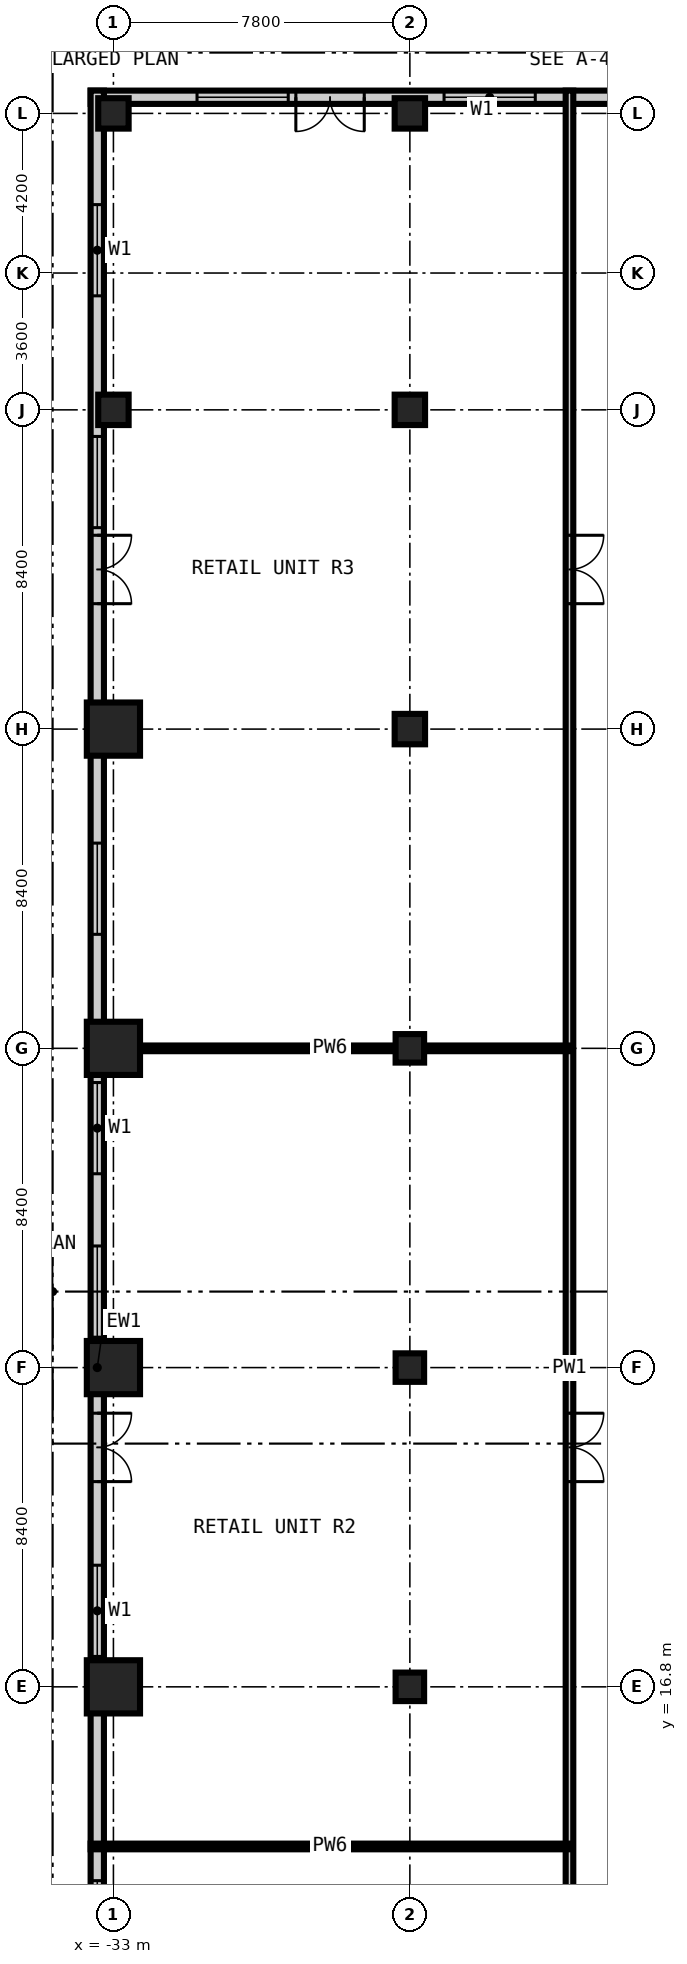
"""IFC4 building model, lengths in metres.
Left out: names, types, materials, properties, quantities, classifications, styles, units other than length and angle.
Written with IfcOpenShell. Run it as: python <this file> out.ifc"""

import sys

from ifc_helpers import new_model, si_unit, direction, frame, frame_2d, origin, origin_2d, place, context, subcontext, project, spatial, rectangle, extrude, element, fill, save


model = new_model("IFC4")
c1 = context("Model", 3, precision=1e-05, world=origin(), true_north=direction((0.0, 1.0)))
c2 = subcontext(c1, "Body", "Model", "MODEL_VIEW")
j1 = project(units=[si_unit("LENGTHUNIT", "METRE"), si_unit("PLANEANGLEUNIT", "RADIAN")], contexts=[c1])
p1 = place(None, origin())
s1 = spatial("IfcSite", under=j1, at=p1, CompositionType="ELEMENT")
p2 = place(p1, origin())
s2 = spatial("IfcBuilding", under=s1, at=p2, CompositionType="ELEMENT")
p3 = place(p2, origin())
s3 = spatial("IfcBuildingStorey", under=s2, at=p3, CompositionType="ELEMENT", Elevation=0.0)
for number, where, z_axis, x_axis in (
    (1, (-33.0, 16.8, -0.5), (0.0, 0.0, 1.0), (1.0, 0.0, 0.0)),
    (2, (-33.0, 25.2, -0.5), (0.0, 0.0, 1.0), (1.0, 0.0, 0.0)),
    (3, (-33.0, 33.6, -0.5), (0.0, 0.0, 1.0), (1.0, 0.0, 0.0)),
):
    element("IfcColumn", number, at=place(p3, frame(where, z_axis=z_axis, x_axis=x_axis)), inside=s3, PredefinedType="COLUMN", context=c2, shape_type="SweptSolid", body=[
        extrude(rectangle(XDim=1.4, YDim=1.4, at=origin_2d()), origin(), (0.0, 0.0, 1.0), 6.2),
    ])
p4 = place(p3, frame((-33.0, 42.0, -0.3), z_axis=(0.0, 0.0, 1.0), x_axis=(1.0, 0.0, 0.0)))
e4 = element("IfcColumn", 4, at=p4, inside=s3, PredefinedType="COLUMN", context=c2, shape_type="SweptSolid", body=[
    extrude(rectangle(XDim=1.4, YDim=1.4, at=origin_2d()), origin(), (0.0, 0.0, 1.0), 6.0),
])
for number, where, z_axis, x_axis in (
    (5, (-33.0, 50.4, -0.5), (0.0, 0.0, 1.0), (1.0, 0.0, 0.0)),
    (6, (-33.0, 58.2, -0.5), (0.0, 0.0, 1.0), (1.0, 0.0, 0.0)),
):
    element("IfcColumn", number, at=place(p3, frame(where, z_axis=z_axis, x_axis=x_axis)), inside=s3, PredefinedType="COLUMN", context=c2, shape_type="SweptSolid", body=[
        extrude(rectangle(XDim=0.8, YDim=0.8, at=origin_2d()), origin(), (0.0, 0.0, 1.0), 6.2),
    ])
for number, where, z_axis, x_axis in (
    (7, (-25.2, 16.8, -0.5), (0.0, 0.0, 1.0), (1.0, 0.0, 0.0)),
    (8, (-25.2, 25.2, -0.5), (0.0, 0.0, 1.0), (1.0, 0.0, 0.0)),
    (9, (-25.2, 33.6, -0.5), (0.0, 0.0, 1.0), (1.0, 0.0, 0.0)),
):
    element("IfcColumn", number, at=place(p3, frame(where, z_axis=z_axis, x_axis=x_axis)), inside=s3, PredefinedType="COLUMN", context=c2, shape_type="SweptSolid", body=[
        extrude(rectangle(XDim=0.75, YDim=0.75, at=origin_2d()), origin(), (0.0, 0.0, 1.0), 6.2),
    ])
p5 = place(p3, frame((-25.2, 42.0, -0.3), z_axis=(0.0, 0.0, 1.0), x_axis=(1.0, 0.0, 0.0)))
e10 = element("IfcColumn", 10, at=p5, inside=s3, PredefinedType="COLUMN", context=c2, shape_type="SweptSolid", body=[
    extrude(rectangle(XDim=0.8, YDim=0.8, at=origin_2d()), origin(), (0.0, 0.0, 1.0), 6.0),
])
for number, where, z_axis, x_axis in (
    (11, (-25.2, 50.4, -0.5), (0.0, 0.0, 1.0), (1.0, 0.0, 0.0)),
    (12, (-25.2, 58.2, -0.5), (0.0, 0.0, 1.0), (1.0, 0.0, 0.0)),
):
    element("IfcColumn", number, at=place(p3, frame(where, z_axis=z_axis, x_axis=x_axis)), inside=s3, PredefinedType="COLUMN", context=c2, shape_type="SweptSolid", body=[
        extrude(rectangle(XDim=0.8, YDim=0.8, at=origin_2d()), origin(), (0.0, 0.0, 1.0), 6.2),
    ])
p6 = place(p3, frame((58.8, 58.625, 0.0), z_axis=(0.0, 0.0, 1.0), x_axis=(-1.0, 0.0, 0.0)))
e13 = element("IfcWall", 13, at=p6, inside=s3, PredefinedType="SOLIDWALL", context=c2, shape_type="SweptSolid", body=[
    extrude(rectangle(XDim=92.4, YDim=0.35, at=frame_2d((46.2, 0.0))), origin(), (0.0, 0.0, 1.0), 5.7),
])
p7 = place(p6, frame((85.2, 0.0, 0.0)))
e14 = element("IfcOpeningElement", 14, at=p7, cuts=e13, PredefinedType="OPENING", context=c2, shape_type="SweptSolid", body=[
    extrude(rectangle(XDim=1.8, YDim=2.7, at=frame_2d((0.9, 1.35))), frame((0.0, 0.185, 0.0), z_axis=(0.0, -1.0, 0.0), x_axis=(1.0, 0.0, 0.0)), (0.0, 0.0, 1.0), 0.37),
])
p8 = place(p6, frame((87.2, 0.0, 0.9)))
e15 = element("IfcOpeningElement", 15, at=p8, cuts=e13, PredefinedType="OPENING", context=c2, shape_type="SweptSolid", body=[
    extrude(rectangle(XDim=2.4, YDim=2.4, at=frame_2d((1.2, 1.2))), frame((0.0, 0.185, 0.0), z_axis=(0.0, -1.0, 0.0), x_axis=(1.0, 0.0, 0.0)), (0.0, 0.0, 1.0), 0.37),
])
p9 = place(p6, frame((80.7, 0.0, 0.9)))
e16 = element("IfcOpeningElement", 16, at=p9, cuts=e13, PredefinedType="OPENING", context=c2, shape_type="SweptSolid", body=[
    extrude(rectangle(XDim=2.4, YDim=2.4, at=frame_2d((1.2, 1.2))), frame((0.0, 0.185, 0.0), z_axis=(0.0, -1.0, 0.0), x_axis=(1.0, 0.0, 0.0)), (0.0, 0.0, 1.0), 0.37),
])
p10 = place(p6, frame((76.2, 0.0, 0.9)))
e17 = element("IfcOpeningElement", 17, at=p10, cuts=e13, PredefinedType="OPENING", context=c2, shape_type="SweptSolid", body=[
    extrude(rectangle(XDim=2.4, YDim=2.4, at=frame_2d((1.2, 1.2))), frame((0.0, 0.185, 0.0), z_axis=(0.0, -1.0, 0.0), x_axis=(1.0, 0.0, 0.0)), (0.0, 0.0, 1.0), 0.37),
])
p11 = place(p6, frame((71.9, 0.0, 0.0)))
e18 = element("IfcOpeningElement", 18, at=p11, cuts=e13, PredefinedType="OPENING", context=c2, shape_type="SweptSolid", body=[
    extrude(rectangle(XDim=1.2, YDim=2.4, at=frame_2d((0.6, 1.2))), frame((0.0, 0.185, 0.0), z_axis=(0.0, -1.0, 0.0), x_axis=(1.0, 0.0, 0.0)), (0.0, 0.0, 1.0), 0.37),
])
p12 = place(p6, frame((63.5, 0.0, 0.0)))
e19 = element("IfcOpeningElement", 19, at=p12, cuts=e13, PredefinedType="OPENING", context=c2, shape_type="SweptSolid", body=[
    extrude(rectangle(XDim=1.2, YDim=2.4, at=frame_2d((0.6, 1.2))), frame((0.0, 0.185, 0.0), z_axis=(0.0, -1.0, 0.0), x_axis=(1.0, 0.0, 0.0)), (0.0, 0.0, 1.0), 0.37),
])
p13 = place(p6, frame((59.0, 0.0, 0.0)))
e20 = element("IfcOpeningElement", 20, at=p13, cuts=e13, PredefinedType="OPENING", context=c2, shape_type="SweptSolid", body=[
    extrude(rectangle(XDim=2.4, YDim=3.0, at=frame_2d((1.2, 1.5))), frame((0.0, 0.185, 0.0), z_axis=(0.0, -1.0, 0.0), x_axis=(1.0, 0.0, 0.0)), (0.0, 0.0, 1.0), 0.37),
])
p14 = place(p6, frame((53.4, 0.0, 0.9)))
e21 = element("IfcOpeningElement", 21, at=p14, cuts=e13, PredefinedType="OPENING", context=c2, shape_type="SweptSolid", body=[
    extrude(rectangle(XDim=2.4, YDim=2.4, at=frame_2d((1.2, 1.2))), frame((0.0, 0.185, 0.0), z_axis=(0.0, -1.0, 0.0), x_axis=(1.0, 0.0, 0.0)), (0.0, 0.0, 1.0), 0.37),
])
p15 = place(p6, frame((43.25, 0.0, 0.0)))
e22 = element("IfcOpeningElement", 22, at=p15, cuts=e13, PredefinedType="OPENING", context=c2, shape_type="SweptSolid", body=[
    extrude(rectangle(XDim=2.4, YDim=3.0, at=frame_2d((1.2, 1.5))), frame((0.0, 0.185, 0.0), z_axis=(0.0, -1.0, 0.0), x_axis=(1.0, 0.0, 0.0)), (0.0, 0.0, 1.0), 0.37),
])
p16 = place(p6, frame((37.7, 0.0, 0.0)))
e23 = element("IfcOpeningElement", 23, at=p16, cuts=e13, PredefinedType="OPENING", context=c2, shape_type="SweptSolid", body=[
    extrude(rectangle(XDim=1.2, YDim=2.4, at=frame_2d((0.6, 1.2))), frame((0.0, 0.185, 0.0), z_axis=(0.0, -1.0, 0.0), x_axis=(1.0, 0.0, 0.0)), (0.0, 0.0, 1.0), 0.37),
])
p17 = place(p6, frame((29.2, 0.0, 0.0)))
e24 = element("IfcOpeningElement", 24, at=p17, cuts=e13, PredefinedType="OPENING", context=c2, shape_type="SweptSolid", body=[
    extrude(rectangle(XDim=1.2, YDim=2.4, at=frame_2d((0.6, 1.2))), frame((0.0, 0.185, 0.0), z_axis=(0.0, -1.0, 0.0), x_axis=(1.0, 0.0, 0.0)), (0.0, 0.0, 1.0), 0.37),
])
p18 = place(p6, frame((3.5, 0.0, 0.0)))
e25 = element("IfcOpeningElement", 25, at=p18, cuts=e13, PredefinedType="OPENING", context=c2, shape_type="SweptSolid", body=[
    extrude(rectangle(XDim=3.6, YDim=4.5, at=frame_2d((1.8, 2.25))), frame((0.0, 0.185, 0.0), z_axis=(0.0, -1.0, 0.0), x_axis=(1.0, 0.0, 0.0)), (0.0, 0.0, 1.0), 0.37),
])
p19 = place(p6, frame((11.4, 0.0, 0.9)))
e26 = element("IfcOpeningElement", 26, at=p19, cuts=e13, PredefinedType="OPENING", context=c2, shape_type="SweptSolid", body=[
    extrude(rectangle(XDim=2.4, YDim=2.4, at=frame_2d((1.2, 1.2))), frame((0.0, 0.185, 0.0), z_axis=(0.0, -1.0, 0.0), x_axis=(1.0, 0.0, 0.0)), (0.0, 0.0, 1.0), 0.37),
])
p20 = place(p3, frame((-33.425, 58.8, 0.0), z_axis=(0.0, 0.0, 1.0), x_axis=(0.0, -1.0, 0.0)))
e27 = element("IfcWall", 27, at=p20, inside=s3, PredefinedType="SOLIDWALL", context=c2, shape_type="SweptSolid", body=[
    extrude(rectangle(XDim=67.2, YDim=0.35, at=frame_2d((33.6, 0.0))), origin(), (0.0, 0.0, 1.0), 5.7),
])
p21 = place(p20, frame((55.8, 0.0, 0.0)))
e28 = element("IfcOpeningElement", 28, at=p21, cuts=e27, PredefinedType="OPENING", context=c2, shape_type="SweptSolid", body=[
    extrude(rectangle(XDim=1.8, YDim=2.7, at=frame_2d((0.9, 1.35))), frame((0.0, 0.185, 0.0), z_axis=(0.0, -1.0, 0.0), x_axis=(1.0, 0.0, 0.0)), (0.0, 0.0, 1.0), 0.37),
])
p22 = place(p20, frame((61.8, 0.0, 0.9)))
e29 = element("IfcOpeningElement", 29, at=p22, cuts=e27, PredefinedType="OPENING", context=c2, shape_type="SweptSolid", body=[
    extrude(rectangle(XDim=2.4, YDim=2.4, at=frame_2d((1.2, 1.2))), frame((0.0, 0.185, 0.0), z_axis=(0.0, -1.0, 0.0), x_axis=(1.0, 0.0, 0.0)), (0.0, 0.0, 1.0), 0.37),
])
p23 = place(p20, frame((53.2, 0.0, 0.9)))
e30 = element("IfcOpeningElement", 30, at=p23, cuts=e27, PredefinedType="OPENING", context=c2, shape_type="SweptSolid", body=[
    extrude(rectangle(XDim=2.4, YDim=2.4, at=frame_2d((1.2, 1.2))), frame((0.0, 0.185, 0.0), z_axis=(0.0, -1.0, 0.0), x_axis=(1.0, 0.0, 0.0)), (0.0, 0.0, 1.0), 0.37),
])
p24 = place(p20, frame((47.1, 0.0, 0.9)))
e31 = element("IfcOpeningElement", 31, at=p24, cuts=e27, PredefinedType="OPENING", context=c2, shape_type="SweptSolid", body=[
    extrude(rectangle(XDim=2.4, YDim=2.4, at=frame_2d((1.2, 1.2))), frame((0.0, 0.185, 0.0), z_axis=(0.0, -1.0, 0.0), x_axis=(1.0, 0.0, 0.0)), (0.0, 0.0, 1.0), 0.37),
])
p25 = place(p20, frame((34.8, 0.0, 0.0)))
e32 = element("IfcOpeningElement", 32, at=p25, cuts=e27, PredefinedType="OPENING", context=c2, shape_type="SweptSolid", body=[
    extrude(rectangle(XDim=1.8, YDim=2.7, at=frame_2d((0.9, 1.35))), frame((0.0, 0.185, 0.0), z_axis=(0.0, -1.0, 0.0), x_axis=(1.0, 0.0, 0.0)), (0.0, 0.0, 1.0), 0.37),
])
p26 = place(p20, frame((38.8, 0.0, 0.9)))
e33 = element("IfcOpeningElement", 33, at=p26, cuts=e27, PredefinedType="OPENING", context=c2, shape_type="SweptSolid", body=[
    extrude(rectangle(XDim=2.4, YDim=2.4, at=frame_2d((1.2, 1.2))), frame((0.0, 0.185, 0.0), z_axis=(0.0, -1.0, 0.0), x_axis=(1.0, 0.0, 0.0)), (0.0, 0.0, 1.0), 0.37),
])
p27 = place(p20, frame((30.4, 0.0, 0.9)))
e34 = element("IfcOpeningElement", 34, at=p27, cuts=e27, PredefinedType="OPENING", context=c2, shape_type="SweptSolid", body=[
    extrude(rectangle(XDim=2.4, YDim=2.4, at=frame_2d((1.2, 1.2))), frame((0.0, 0.185, 0.0), z_axis=(0.0, -1.0, 0.0), x_axis=(1.0, 0.0, 0.0)), (0.0, 0.0, 1.0), 0.37),
])
p28 = place(p20, frame((26.1, 0.0, 0.9)))
e35 = element("IfcOpeningElement", 35, at=p28, cuts=e27, PredefinedType="OPENING", context=c2, shape_type="SweptSolid", body=[
    extrude(rectangle(XDim=2.4, YDim=2.4, at=frame_2d((1.2, 1.2))), frame((0.0, 0.185, 0.0), z_axis=(0.0, -1.0, 0.0), x_axis=(1.0, 0.0, 0.0)), (0.0, 0.0, 1.0), 0.37),
])
p29 = place(p20, frame((11.7, 0.0, 0.0)))
e36 = element("IfcOpeningElement", 36, at=p29, cuts=e27, PredefinedType="OPENING", context=c2, shape_type="SweptSolid", body=[
    extrude(rectangle(XDim=1.8, YDim=2.7, at=frame_2d((0.9, 1.35))), frame((0.0, 0.185, 0.0), z_axis=(0.0, -1.0, 0.0), x_axis=(1.0, 0.0, 0.0)), (0.0, 0.0, 1.0), 0.37),
])
p30 = place(p20, frame((19.8, 0.0, 0.9)))
e37 = element("IfcOpeningElement", 37, at=p30, cuts=e27, PredefinedType="OPENING", context=c2, shape_type="SweptSolid", body=[
    extrude(rectangle(XDim=2.4, YDim=2.4, at=frame_2d((1.2, 1.2))), frame((0.0, 0.185, 0.0), z_axis=(0.0, -1.0, 0.0), x_axis=(1.0, 0.0, 0.0)), (0.0, 0.0, 1.0), 0.37),
])
p31 = place(p20, frame((9.1, 0.0, 0.9)))
e38 = element("IfcOpeningElement", 38, at=p31, cuts=e27, PredefinedType="OPENING", context=c2, shape_type="SweptSolid", body=[
    extrude(rectangle(XDim=2.4, YDim=2.4, at=frame_2d((1.2, 1.2))), frame((0.0, 0.185, 0.0), z_axis=(0.0, -1.0, 0.0), x_axis=(1.0, 0.0, 0.0)), (0.0, 0.0, 1.0), 0.37),
])
p32 = place(p20, frame((3.0, 0.0, 0.9)))
e39 = element("IfcOpeningElement", 39, at=p32, cuts=e27, PredefinedType="OPENING", context=c2, shape_type="SweptSolid", body=[
    extrude(rectangle(XDim=2.4, YDim=2.4, at=frame_2d((1.2, 1.2))), frame((0.0, 0.185, 0.0), z_axis=(0.0, -1.0, 0.0), x_axis=(1.0, 0.0, 0.0)), (0.0, 0.0, 1.0), 0.37),
])
p33 = place(p3, frame((-21.0, 58.8, 0.0), z_axis=(0.0, 0.0, 1.0), x_axis=(0.0, -1.0, 0.0)))
e40 = element("IfcWall", 40, at=p33, inside=s3, PredefinedType="PARTITIONING", context=c2, shape_type="SweptSolid", body=[
    extrude(rectangle(XDim=67.2, YDim=0.2, at=frame_2d((33.6, 0.0))), origin(), (0.0, 0.0, 1.0), 5.7),
])
p34 = place(p33, frame((55.8, 0.0, 0.0)))
e41 = element("IfcOpeningElement", 41, at=p34, cuts=e40, PredefinedType="OPENING", context=c2, shape_type="SweptSolid", body=[
    extrude(rectangle(XDim=1.8, YDim=2.7, at=frame_2d((0.9, 1.35))), frame((0.0, 0.11, 0.0), z_axis=(0.0, -1.0, 0.0), x_axis=(1.0, 0.0, 0.0)), (0.0, 0.0, 1.0), 0.22),
])
p35 = place(p33, frame((34.8, 0.0, 0.0)))
e42 = element("IfcOpeningElement", 42, at=p35, cuts=e40, PredefinedType="OPENING", context=c2, shape_type="SweptSolid", body=[
    extrude(rectangle(XDim=1.8, YDim=2.7, at=frame_2d((0.9, 1.35))), frame((0.0, 0.11, 0.0), z_axis=(0.0, -1.0, 0.0), x_axis=(1.0, 0.0, 0.0)), (0.0, 0.0, 1.0), 0.22),
])
p36 = place(p33, frame((11.7, 0.0, 0.0)))
e43 = element("IfcOpeningElement", 43, at=p36, cuts=e40, PredefinedType="OPENING", context=c2, shape_type="SweptSolid", body=[
    extrude(rectangle(XDim=1.8, YDim=2.7, at=frame_2d((0.9, 1.35))), frame((0.0, 0.11, 0.0), z_axis=(0.0, -1.0, 0.0), x_axis=(1.0, 0.0, 0.0)), (0.0, 0.0, 1.0), 0.22),
])
for number, where, z_axis, x_axis in (
    (44, (-33.6, 12.6, 0.0), (0.0, 0.0, 1.0), (1.0, 0.0, 0.0)),
    (45, (-33.6, 33.6, 0.0), (0.0, 0.0, 1.0), (1.0, 0.0, 0.0)),
):
    element("IfcWall", number, at=place(p3, frame(where, z_axis=z_axis, x_axis=x_axis)), inside=s3, PredefinedType="PARTITIONING", context=c2, shape_type="SweptSolid", body=[
        extrude(rectangle(XDim=12.6, YDim=0.15, at=frame_2d((6.3, 0.0))), origin(), (0.0, 0.0, 1.0), 5.7),
    ])
p37 = place(p7, origin())
e46 = element("IfcDoor", 46, at=p37, inside=s3, OperationType="DOUBLE_DOOR_DOUBLE_SWING", PredefinedType="DOOR", context=c2, shape_type="SweptSolid", body=[
    extrude(rectangle(XDim=1.8, YDim=2.7, at=frame_2d((0.9, 1.35))), frame((0.0, 0.025, 0.0), z_axis=(0.0, -1.0, 0.0), x_axis=(1.0, 0.0, 0.0)), (0.0, 0.0, 1.0), 0.05),
])
fill(e14, e46)
p38 = place(p8, origin())
e47 = element("IfcWindow", 47, at=p38, inside=s3, PartitioningType="SINGLE_PANEL", PredefinedType="WINDOW", context=c2, shape_type="SweptSolid", body=[
    extrude(rectangle(XDim=2.4, YDim=2.4, at=frame_2d((1.2, 1.2))), frame((0.0, 0.03, 0.0), z_axis=(0.0, -1.0, 0.0), x_axis=(1.0, 0.0, 0.0)), (0.0, 0.0, 1.0), 0.06),
])
fill(e15, e47)
p39 = place(p9, origin())
e48 = element("IfcWindow", 48, at=p39, inside=s3, PartitioningType="SINGLE_PANEL", PredefinedType="WINDOW", context=c2, shape_type="SweptSolid", body=[
    extrude(rectangle(XDim=2.4, YDim=2.4, at=frame_2d((1.2, 1.2))), frame((0.0, 0.03, 0.0), z_axis=(0.0, -1.0, 0.0), x_axis=(1.0, 0.0, 0.0)), (0.0, 0.0, 1.0), 0.06),
])
fill(e16, e48)
p40 = place(p24, origin())
e49 = element("IfcWindow", 49, at=p40, inside=s3, PartitioningType="SINGLE_PANEL", PredefinedType="WINDOW", context=c2, shape_type="SweptSolid", body=[
    extrude(rectangle(XDim=2.4, YDim=2.4, at=frame_2d((1.2, 1.2))), frame((0.0, 0.03, 0.0), z_axis=(0.0, -1.0, 0.0), x_axis=(1.0, 0.0, 0.0)), (0.0, 0.0, 1.0), 0.06),
])
fill(e31, e49)
p41 = place(p25, origin())
e50 = element("IfcDoor", 50, at=p41, inside=s3, OperationType="DOUBLE_DOOR_DOUBLE_SWING", PredefinedType="DOOR", context=c2, shape_type="SweptSolid", body=[
    extrude(rectangle(XDim=1.8, YDim=2.7, at=frame_2d((0.9, 1.35))), frame((0.0, 0.025, 0.0), z_axis=(0.0, -1.0, 0.0), x_axis=(1.0, 0.0, 0.0)), (0.0, 0.0, 1.0), 0.05),
])
fill(e32, e50)
p42 = place(p26, origin())
e51 = element("IfcWindow", 51, at=p42, inside=s3, PartitioningType="SINGLE_PANEL", PredefinedType="WINDOW", context=c2, shape_type="SweptSolid", body=[
    extrude(rectangle(XDim=2.4, YDim=2.4, at=frame_2d((1.2, 1.2))), frame((0.0, 0.03, 0.0), z_axis=(0.0, -1.0, 0.0), x_axis=(1.0, 0.0, 0.0)), (0.0, 0.0, 1.0), 0.06),
])
fill(e33, e51)
p43 = place(p27, origin())
e52 = element("IfcWindow", 52, at=p43, inside=s3, PartitioningType="SINGLE_PANEL", PredefinedType="WINDOW", context=c2, shape_type="SweptSolid", body=[
    extrude(rectangle(XDim=2.4, YDim=2.4, at=frame_2d((1.2, 1.2))), frame((0.0, 0.03, 0.0), z_axis=(0.0, -1.0, 0.0), x_axis=(1.0, 0.0, 0.0)), (0.0, 0.0, 1.0), 0.06),
])
fill(e34, e52)
p44 = place(p28, origin())
e53 = element("IfcWindow", 53, at=p44, inside=s3, PartitioningType="SINGLE_PANEL", PredefinedType="WINDOW", context=c2, shape_type="SweptSolid", body=[
    extrude(rectangle(XDim=2.4, YDim=2.4, at=frame_2d((1.2, 1.2))), frame((0.0, 0.03, 0.0), z_axis=(0.0, -1.0, 0.0), x_axis=(1.0, 0.0, 0.0)), (0.0, 0.0, 1.0), 0.06),
])
fill(e35, e53)
p45 = place(p29, origin())
e54 = element("IfcDoor", 54, at=p45, inside=s3, OperationType="DOUBLE_DOOR_DOUBLE_SWING", PredefinedType="DOOR", context=c2, shape_type="SweptSolid", body=[
    extrude(rectangle(XDim=1.8, YDim=2.7, at=frame_2d((0.9, 1.35))), frame((0.0, 0.025, 0.0), z_axis=(0.0, -1.0, 0.0), x_axis=(1.0, 0.0, 0.0)), (0.0, 0.0, 1.0), 0.05),
])
fill(e36, e54)
p46 = place(p30, origin())
e55 = element("IfcWindow", 55, at=p46, inside=s3, PartitioningType="SINGLE_PANEL", PredefinedType="WINDOW", context=c2, shape_type="SweptSolid", body=[
    extrude(rectangle(XDim=2.4, YDim=2.4, at=frame_2d((1.2, 1.2))), frame((0.0, 0.03, 0.0), z_axis=(0.0, -1.0, 0.0), x_axis=(1.0, 0.0, 0.0)), (0.0, 0.0, 1.0), 0.06),
])
fill(e37, e55)
p47 = place(p31, origin())
e56 = element("IfcWindow", 56, at=p47, inside=s3, PartitioningType="SINGLE_PANEL", PredefinedType="WINDOW", context=c2, shape_type="SweptSolid", body=[
    extrude(rectangle(XDim=2.4, YDim=2.4, at=frame_2d((1.2, 1.2))), frame((0.0, 0.03, 0.0), z_axis=(0.0, -1.0, 0.0), x_axis=(1.0, 0.0, 0.0)), (0.0, 0.0, 1.0), 0.06),
])
fill(e38, e56)
p48 = place(p32, origin())
e57 = element("IfcWindow", 57, at=p48, inside=s3, PartitioningType="SINGLE_PANEL", PredefinedType="WINDOW", context=c2, shape_type="SweptSolid", body=[
    extrude(rectangle(XDim=2.4, YDim=2.4, at=frame_2d((1.2, 1.2))), frame((0.0, 0.03, 0.0), z_axis=(0.0, -1.0, 0.0), x_axis=(1.0, 0.0, 0.0)), (0.0, 0.0, 1.0), 0.06),
])
fill(e39, e57)
p49 = place(p35, origin())
e58 = element("IfcDoor", 58, at=p49, inside=s3, OperationType="DOUBLE_DOOR_DOUBLE_SWING", PredefinedType="DOOR", context=c2, shape_type="SweptSolid", body=[
    extrude(rectangle(XDim=1.8, YDim=2.7, at=frame_2d((0.9, 1.35))), frame((0.0, 0.025, 0.0), z_axis=(0.0, -1.0, 0.0), x_axis=(1.0, 0.0, 0.0)), (0.0, 0.0, 1.0), 0.05),
])
fill(e42, e58)
p50 = place(p36, origin())
e59 = element("IfcDoor", 59, at=p50, inside=s3, OperationType="DOUBLE_DOOR_DOUBLE_SWING", PredefinedType="DOOR", context=c2, shape_type="SweptSolid", body=[
    extrude(rectangle(XDim=1.8, YDim=2.7, at=frame_2d((0.9, 1.35))), frame((0.0, 0.025, 0.0), z_axis=(0.0, -1.0, 0.0), x_axis=(1.0, 0.0, 0.0)), (0.0, 0.0, 1.0), 0.05),
])
fill(e43, e59)
save(model, sys.argv[1])
